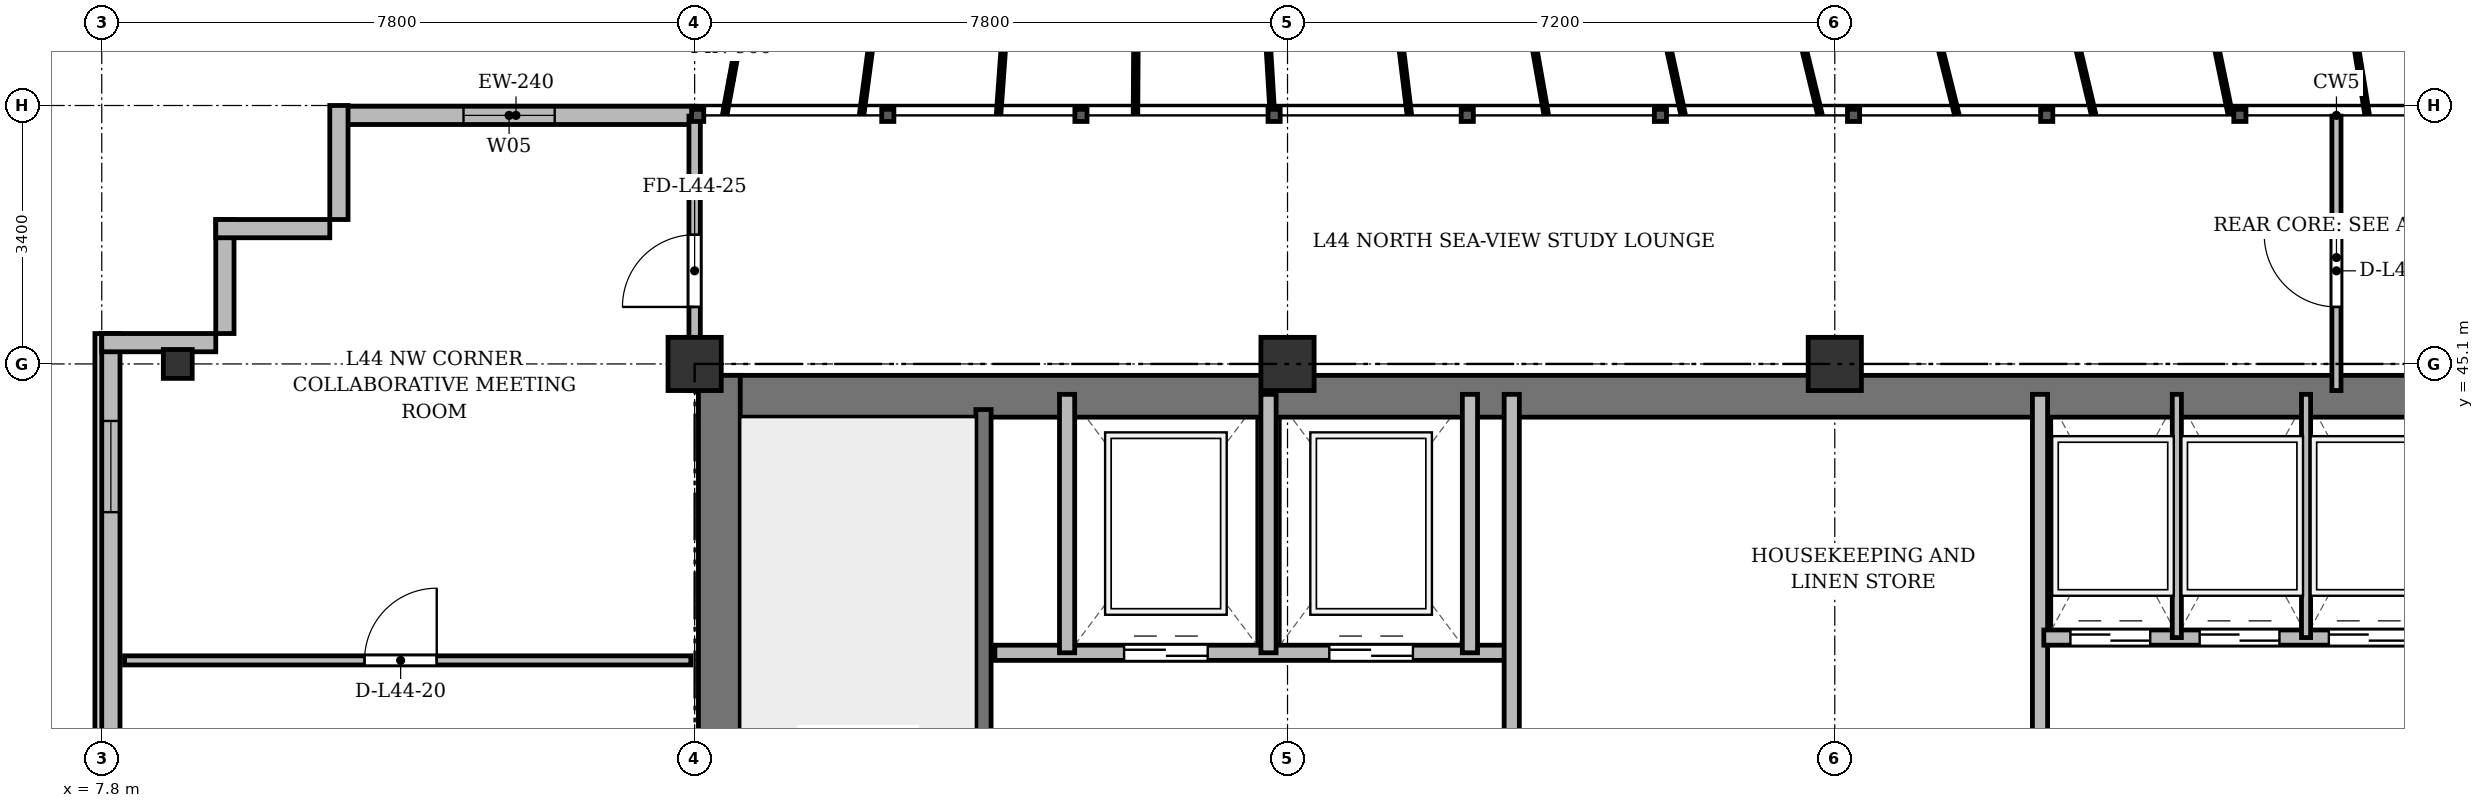
"""IFC4 building model, lengths in metres.
Left out: names, types, materials, properties, quantities, classifications, styles, units other than length and angle.
Written with IfcOpenShell. Run it as: python <this file> out.ifc"""

import sys

from ifc_helpers import new_model, si_unit, direction, frame, frame_2d, origin, origin_2d, place, context, subcontext, project, spatial, rectangle, i_section, extrude, source, transform, mapped, element, fill, save


model = new_model("IFC4")
c1 = context("Model", 3, precision=1e-05, world=origin(), true_north=direction((0.0, 1.0)))
c2 = subcontext(c1, "Body", "Model", "MODEL_VIEW")
j1 = project(units=[si_unit("LENGTHUNIT", "METRE"), si_unit("PLANEANGLEUNIT", "RADIAN")], contexts=[c1])
p1 = place(None, origin())
s1 = spatial("IfcSite", under=j1, at=p1, CompositionType="ELEMENT")
p2 = place(p1, origin())
s2 = spatial("IfcBuilding", under=s1, at=p2, CompositionType="ELEMENT")
p3 = place(p2, frame((0.0, 0.0, 168.1)))
s3 = spatial("IfcBuildingStorey", under=s2, at=p3, CompositionType="ELEMENT", Elevation=168.1)
m1 = source(origin(), c2, "Body", "SweptSolid", [
    extrude(i_section(OverallWidth=0.38, OverallDepth=0.38, WebThickness=0.02, FlangeThickness=0.03, at=origin_2d()), origin(), (0.0, 0.0, 1.0), 3.6),
])
p4 = place(p3, frame((8.8, 45.1, 0.0), z_axis=(0.0, 0.0, 1.0), x_axis=(1.0, 0.0, 0.0)))
e1 = element("IfcColumn", 1, at=p4, inside=s3, PredefinedType="COLUMN", context=c2, shape_type="MappedRepresentation", body=[
    mapped(m1, transform((0.0, 0.0, 0.0), x_axis=(1.0, 0.0, 0.0), y_axis=(0.0, 1.0, 0.0), z_axis=(0.0, 0.0, 1.0), scale=1.0)),
])
m2 = source(origin(), c2, "Body", "SweptSolid", [
    extrude(rectangle(XDim=0.7, YDim=0.7, at=origin_2d()), origin(), (0.0, 0.0, 1.0), 3.6),
])
for number, where, z_axis, x_axis in (
    (2, (15.6, 45.1, 0.0), (0.0, 0.0, 1.0), (1.0, 0.0, 0.0)),
    (3, (23.4, 45.1, 0.0), (0.0, 0.0, 1.0), (1.0, 0.0, 0.0)),
    (4, (30.6, 45.1, 0.0), (0.0, 0.0, 1.0), (1.0, 0.0, 0.0)),
):
    element("IfcColumn", number, at=place(p3, frame(where, z_axis=z_axis, x_axis=x_axis)), inside=s3, PredefinedType="COLUMN", context=c2, shape_type="MappedRepresentation", body=[
        mapped(m2, transform((0.0, 0.0, 0.0), x_axis=(1.0, 0.0, 0.0), y_axis=(0.0, 1.0, 0.0), z_axis=(0.0, 0.0, 1.0), scale=1.0)),
    ])
p5 = place(p3, frame((10.9, 48.37, 0.0), z_axis=(0.0, 0.0, 1.0), x_axis=(1.0, 0.0, 0.0)))
e5 = element("IfcWall", 5, at=p5, inside=s3, PredefinedType="SOLIDWALL", context=c2, shape_type="SweptSolid", body=[
    extrude(rectangle(XDim=4.7, YDim=0.24, at=frame_2d((2.35, 0.0))), origin(), (0.0, 0.0, 1.0), 3.35),
])
p6 = place(p5, frame((1.659, 0.0, 0.9)))
e6 = element("IfcOpeningElement", 6, at=p6, cuts=e5, PredefinedType="OPENING", context=c2, shape_type="SweptSolid", body=[
    extrude(rectangle(XDim=1.2, YDim=1.65, at=frame_2d((0.6, 0.825))), frame((0.0, 0.13, 0.0), z_axis=(0.0, -1.0, 0.0), x_axis=(1.0, 0.0, 0.0)), (0.0, 0.0, 1.0), 0.26),
])
p7 = place(p3, frame((7.92, 6.3, 0.0), z_axis=(0.0, 0.0, 1.0), x_axis=(0.0, 1.0, 0.0)))
e7 = element("IfcWall", 7, at=p7, inside=s3, PredefinedType="SOLIDWALL", context=c2, shape_type="SweptSolid", body=[
    extrude(rectangle(XDim=39.2, YDim=0.24, at=frame_2d((19.6, 0.0))), origin(), (0.0, 0.0, 1.0), 3.35),
])
p8 = place(p7, frame((1.45, 0.0, 0.92)))
e8 = element("IfcOpeningElement", 8, at=p8, cuts=e7, PredefinedType="OPENING", context=c2, shape_type="SweptSolid", body=[
    extrude(rectangle(XDim=1.2, YDim=1.65, at=frame_2d((0.6, 0.825))), frame((0.0, 0.13, 0.0), z_axis=(0.0, -1.0, 0.0), x_axis=(1.0, 0.0, 0.0)), (0.0, 0.0, 1.0), 0.26),
])
p9 = place(p7, frame((3.8, 0.0, 0.92)))
e9 = element("IfcOpeningElement", 9, at=p9, cuts=e7, PredefinedType="OPENING", context=c2, shape_type="SweptSolid", body=[
    extrude(rectangle(XDim=2.6, YDim=1.9, at=frame_2d((1.3, 0.95))), frame((0.0, 0.13, 0.0), z_axis=(0.0, -1.0, 0.0), x_axis=(1.0, 0.0, 0.0)), (0.0, 0.0, 1.0), 0.26),
])
p10 = place(p7, frame((8.0, 0.0, 0.92)))
e10 = element("IfcOpeningElement", 10, at=p10, cuts=e7, PredefinedType="OPENING", context=c2, shape_type="SweptSolid", body=[
    extrude(rectangle(XDim=2.6, YDim=1.9, at=frame_2d((1.3, 0.95))), frame((0.0, 0.13, 0.0), z_axis=(0.0, -1.0, 0.0), x_axis=(1.0, 0.0, 0.0)), (0.0, 0.0, 1.0), 0.26),
])
p11 = place(p7, frame((15.2, 0.0, 0.92)))
e11 = element("IfcOpeningElement", 11, at=p11, cuts=e7, PredefinedType="OPENING", context=c2, shape_type="SweptSolid", body=[
    extrude(rectangle(XDim=2.6, YDim=1.9, at=frame_2d((1.3, 0.95))), frame((0.0, 0.13, 0.0), z_axis=(0.0, -1.0, 0.0), x_axis=(1.0, 0.0, 0.0)), (0.0, 0.0, 1.0), 0.26),
])
p12 = place(p7, frame((29.2, 0.0, 0.92)))
e12 = element("IfcOpeningElement", 12, at=p12, cuts=e7, PredefinedType="OPENING", context=c2, shape_type="SweptSolid", body=[
    extrude(rectangle(XDim=2.6, YDim=1.9, at=frame_2d((1.3, 0.95))), frame((0.0, 0.13, 0.0), z_axis=(0.0, -1.0, 0.0), x_axis=(1.0, 0.0, 0.0)), (0.0, 0.0, 1.0), 0.26),
])
p13 = place(p7, frame((36.85, 0.0, 0.92)))
e13 = element("IfcOpeningElement", 13, at=p13, cuts=e7, PredefinedType="OPENING", context=c2, shape_type="SweptSolid", body=[
    extrude(rectangle(XDim=1.2, YDim=1.65, at=frame_2d((0.6, 0.825))), frame((0.0, 0.13, 0.0), z_axis=(0.0, -1.0, 0.0), x_axis=(1.0, 0.0, 0.0)), (0.0, 0.0, 1.0), 0.26),
])
for number, where, z_axis, x_axis in (
    (14, (7.8, 45.38, 0.0), (0.0, 0.0, 1.0), (1.0, 0.0, 0.0)),
    (15, (9.42, 45.5, 0.0), (0.0, 0.0, 1.0), (0.0, 1.0, 0.0)),
    (16, (9.3, 46.88, 0.0), (0.0, 0.0, 1.0), (1.0, 0.0, 0.0)),
    (17, (10.92, 47.0, 0.0), (0.0, 0.0, 1.0), (0.0, 1.0, 0.0)),
):
    element("IfcWall", number, at=place(p3, frame(where, z_axis=z_axis, x_axis=x_axis)), inside=s3, PredefinedType="SOLIDWALL", context=c2, shape_type="SweptSolid", body=[
        extrude(rectangle(XDim=1.5, YDim=0.24, at=frame_2d((0.75, 0.0))), origin(), (0.0, 0.0, 1.0), 3.35),
    ])
p14 = place(p3, frame((15.65, 44.675, 0.0), z_axis=(0.0, 0.0, 1.0), x_axis=(1.0, 0.0, 0.0)))
e18 = element("IfcWall", 18, at=p14, inside=s3, PredefinedType="SHEAR", context=c2, shape_type="SweptSolid", body=[
    extrude(rectangle(XDim=43.1, YDim=0.55, at=frame_2d((21.55, 0.0))), origin(), (0.0, 0.0, 1.0), 3.35),
])
p15 = place(p3, frame((15.925, 33.4, 0.0), z_axis=(0.0, 0.0, 1.0), x_axis=(0.0, 1.0, 0.0)))
e19 = element("IfcWall", 19, at=p15, inside=s3, PredefinedType="SHEAR", context=c2, shape_type="SweptSolid", body=[
    extrude(rectangle(XDim=11.55, YDim=0.55, at=frame_2d((5.775, 0.0))), origin(), (0.0, 0.0, 1.0), 3.35),
])
p16 = place(p3, frame((19.4, 33.4, 0.0), z_axis=(0.0, 0.0, 1.0), x_axis=(0.0, 1.0, 0.0)))
e20 = element("IfcWall", 20, at=p16, inside=s3, PredefinedType="SHEAR", context=c2, shape_type="SweptSolid", body=[
    extrude(rectangle(XDim=11.1, YDim=0.2, at=frame_2d((5.55, 0.0))), origin(), (0.0, 0.0, 1.0), 3.35),
])
p17 = place(p16, frame((0.85, 0.0, 0.0)))
e21 = element("IfcOpeningElement", 21, at=p17, cuts=e20, PredefinedType="OPENING", context=c2, shape_type="SweptSolid", body=[
    extrude(rectangle(XDim=1.1, YDim=2.15, at=frame_2d((0.55, 1.075))), frame((0.0, 0.11, 0.0), z_axis=(0.0, -1.0, 0.0), x_axis=(1.0, 0.0, 0.0)), (0.0, 0.0, 1.0), 0.22),
])
p18 = place(p3, frame((19.55, 41.3, 0.0), z_axis=(0.0, 0.0, 1.0), x_axis=(1.0, 0.0, 0.0)))
e22 = element("IfcWall", 22, at=p18, inside=s3, PredefinedType="SOLIDWALL", context=c2, shape_type="SweptSolid", body=[
    extrude(rectangle(XDim=6.75, YDim=0.2, at=frame_2d((3.375, 0.0))), origin(), (0.0, 0.0, 1.0), 3.35),
])
p19 = place(p18, frame((1.7, 0.0, 0.0)))
e23 = element("IfcOpeningElement", 23, at=p19, cuts=e22, PredefinedType="OPENING", context=c2, shape_type="SweptSolid", body=[
    extrude(rectangle(XDim=1.1, YDim=2.15, at=frame_2d((0.55, 1.075))), frame((0.0, 0.11, 0.0), z_axis=(0.0, -1.0, 0.0), x_axis=(1.0, 0.0, 0.0)), (0.0, 0.0, 1.0), 0.22),
])
p20 = place(p18, frame((4.4, 0.0, 0.0)))
e24 = element("IfcOpeningElement", 24, at=p20, cuts=e22, PredefinedType="OPENING", context=c2, shape_type="SweptSolid", body=[
    extrude(rectangle(XDim=1.1, YDim=2.15, at=frame_2d((0.55, 1.075))), frame((0.0, 0.11, 0.0), z_axis=(0.0, -1.0, 0.0), x_axis=(1.0, 0.0, 0.0)), (0.0, 0.0, 1.0), 0.22),
])
for number, where, z_axis, x_axis in (
    (25, (20.5, 41.3, 0.0), (0.0, 0.0, 1.0), (0.0, 1.0, 0.0)),
    (26, (23.15, 41.3, 0.0), (0.0, 0.0, 1.0), (0.0, 1.0, 0.0)),
    (27, (25.8, 41.3, 0.0), (0.0, 0.0, 1.0), (0.0, 1.0, 0.0)),
):
    element("IfcWall", number, at=place(p3, frame(where, z_axis=z_axis, x_axis=x_axis)), inside=s3, PredefinedType="SOLIDWALL", context=c2, shape_type="SweptSolid", body=[
        extrude(rectangle(XDim=3.4, YDim=0.2, at=frame_2d((1.7, 0.0))), origin(), (0.0, 0.0, 1.0), 3.35),
    ])
for number, where, z_axis, x_axis in (
    (28, (26.35, 33.4, 0.0), (0.0, 0.0, 1.0), (0.0, 1.0, 0.0)),
    (29, (33.3, 33.4, 0.0), (0.0, 0.0, 1.0), (0.0, 1.0, 0.0)),
):
    element("IfcWall", number, at=place(p3, frame(where, z_axis=z_axis, x_axis=x_axis)), inside=s3, PredefinedType="SOLIDWALL", context=c2, shape_type="SweptSolid", body=[
        extrude(rectangle(XDim=11.3, YDim=0.2, at=frame_2d((5.65, 0.0))), origin(), (0.0, 0.0, 1.0), 2.75),
    ])
p21 = place(p3, frame((33.35, 41.5, 0.0), z_axis=(0.0, 0.0, 1.0), x_axis=(1.0, 0.0, 0.0)))
e30 = element("IfcWall", 30, at=p21, inside=s3, PredefinedType="SOLIDWALL", context=c2, shape_type="SweptSolid", body=[
    extrude(rectangle(XDim=6.9, YDim=0.2, at=frame_2d((3.45, 0.0))), origin(), (0.0, 0.0, 1.0), 3.35),
])
p22 = place(p21, frame((0.35, 0.0, 0.0)))
e31 = element("IfcOpeningElement", 31, at=p22, cuts=e30, PredefinedType="OPENING", context=c2, shape_type="SweptSolid", body=[
    extrude(rectangle(XDim=1.05, YDim=2.15, at=frame_2d((0.525, 1.075))), frame((0.0, 0.11, 0.0), z_axis=(0.0, -1.0, 0.0), x_axis=(1.0, 0.0, 0.0)), (0.0, 0.0, 1.0), 0.22),
])
p23 = place(p21, frame((2.05, 0.0, 0.0)))
e32 = element("IfcOpeningElement", 32, at=p23, cuts=e30, PredefinedType="OPENING", context=c2, shape_type="SweptSolid", body=[
    extrude(rectangle(XDim=1.05, YDim=2.15, at=frame_2d((0.525, 1.075))), frame((0.0, 0.11, 0.0), z_axis=(0.0, -1.0, 0.0), x_axis=(1.0, 0.0, 0.0)), (0.0, 0.0, 1.0), 0.22),
])
p24 = place(p21, frame((3.75, 0.0, 0.0)))
e33 = element("IfcOpeningElement", 33, at=p24, cuts=e30, PredefinedType="OPENING", context=c2, shape_type="SweptSolid", body=[
    extrude(rectangle(XDim=1.05, YDim=2.15, at=frame_2d((0.525, 1.075))), frame((0.0, 0.11, 0.0), z_axis=(0.0, -1.0, 0.0), x_axis=(1.0, 0.0, 0.0)), (0.0, 0.0, 1.0), 0.22),
])
p25 = place(p21, frame((5.45, 0.0, 0.0)))
e34 = element("IfcOpeningElement", 34, at=p25, cuts=e30, PredefinedType="OPENING", context=c2, shape_type="SweptSolid", body=[
    extrude(rectangle(XDim=1.05, YDim=2.15, at=frame_2d((0.525, 1.075))), frame((0.0, 0.11, 0.0), z_axis=(0.0, -1.0, 0.0), x_axis=(1.0, 0.0, 0.0)), (0.0, 0.0, 1.0), 0.22),
])
for number, where, z_axis, x_axis in (
    (35, (35.1, 41.5, 0.0), (0.0, 0.0, 1.0), (0.0, 1.0, 0.0)),
    (36, (36.8, 41.5, 0.0), (0.0, 0.0, 1.0), (0.0, 1.0, 0.0)),
):
    element("IfcWall", number, at=place(p3, frame(where, z_axis=z_axis, x_axis=x_axis)), inside=s3, PredefinedType="PARTITIONING", context=c2, shape_type="SweptSolid", body=[
        extrude(rectangle(XDim=3.2, YDim=0.12, at=frame_2d((1.6, 0.0))), origin(), (0.0, 0.0, 1.0), 3.35),
    ])
p26 = place(p3, frame((8.1, 41.2, 0.0), z_axis=(0.0, 0.0, 1.0), x_axis=(1.0, 0.0, 0.0)))
e37 = element("IfcWall", 37, at=p26, inside=s3, PredefinedType="PARTITIONING", context=c2, shape_type="SweptSolid", body=[
    extrude(rectangle(XDim=7.45, YDim=0.12, at=frame_2d((3.725, 0.0))), origin(), (0.0, 0.0, 1.0), 2.85),
])
p27 = place(p26, frame((3.157, 0.0, 0.0)))
e38 = element("IfcOpeningElement", 38, at=p27, cuts=e37, PredefinedType="OPENING", context=c2, shape_type="SweptSolid", body=[
    extrude(rectangle(XDim=0.95, YDim=2.15, at=frame_2d((0.475, 1.075))), frame((0.0, 0.07, 0.0), z_axis=(0.0, -1.0, 0.0), x_axis=(1.0, 0.0, 0.0)), (0.0, 0.0, 1.0), 0.14),
])
p28 = place(p3, frame((37.2, 44.75, 0.0), z_axis=(0.0, 0.0, 1.0), x_axis=(0.0, 1.0, 0.0)))
e39 = element("IfcWall", 39, at=p28, inside=s3, PredefinedType="PARTITIONING", context=c2, shape_type="SweptSolid", body=[
    extrude(rectangle(XDim=3.61, YDim=0.12, at=frame_2d((1.805, 0.0))), origin(), (0.0, 0.0, 1.0), 2.75),
])
p29 = place(p28, frame((1.1, 0.0, 0.0)))
e40 = element("IfcOpeningElement", 40, at=p29, cuts=e39, PredefinedType="OPENING", context=c2, shape_type="SweptSolid", body=[
    extrude(rectangle(XDim=0.95, YDim=2.15, at=frame_2d((0.475, 1.075))), frame((0.0, 0.07, 0.0), z_axis=(0.0, -1.0, 0.0), x_axis=(1.0, 0.0, 0.0)), (0.0, 0.0, 1.0), 0.14),
])
p30 = place(p3, frame((15.6, 44.75, 0.0), z_axis=(0.0, 0.0, 1.0), x_axis=(0.0, 1.0, 0.0)))
e41 = element("IfcWall", 41, at=p30, inside=s3, PredefinedType="PARTITIONING", context=c2, shape_type="SweptSolid", body=[
    extrude(rectangle(XDim=3.61, YDim=0.15, at=frame_2d((1.805, 0.0))), origin(), (0.0, 0.0, 1.0), 2.85),
])
p31 = place(p30, frame((1.1, 0.0, 0.0)))
e42 = element("IfcOpeningElement", 42, at=p31, cuts=e41, PredefinedType="OPENING", context=c2, shape_type="SweptSolid", body=[
    extrude(rectangle(XDim=0.95, YDim=2.15, at=frame_2d((0.475, 1.075))), frame((0.0, 0.085, 0.0), z_axis=(0.0, -1.0, 0.0), x_axis=(1.0, 0.0, 0.0)), (0.0, 0.0, 1.0), 0.17),
])
m3 = source(origin(), c2, "Body", "SweptSolid", [
    extrude(rectangle(XDim=1.2, YDim=1.65, at=frame_2d((0.6, 0.825))), frame((0.0, 0.03, 0.0), z_axis=(0.0, -1.0, 0.0), x_axis=(1.0, 0.0, 0.0)), (0.0, 0.0, 1.0), 0.06),
])
p32 = place(p6, origin())
e43 = element("IfcWindow", 43, at=p32, inside=s3, PartitioningType="SINGLE_PANEL", PredefinedType="WINDOW", context=c2, shape_type="MappedRepresentation", body=[
    mapped(m3, transform((0.0, 0.0, 0.0), x_axis=(1.0, 0.0, 0.0), y_axis=(0.0, 1.0, 0.0), z_axis=(0.0, 0.0, 1.0), scale=1.0)),
])
fill(e6, e43)
p33 = place(p13, origin())
e44 = element("IfcWindow", 44, at=p33, inside=s3, PartitioningType="SINGLE_PANEL", PredefinedType="WINDOW", context=c2, shape_type="MappedRepresentation", body=[
    mapped(m3, transform((0.0, 0.0, 0.0), x_axis=(1.0, 0.0, 0.0), y_axis=(0.0, 1.0, 0.0), z_axis=(0.0, 0.0, 1.0), scale=1.0)),
])
fill(e13, e44)
m4 = source(origin(), c2, "Body", "SweptSolid", [
    extrude(rectangle(XDim=1.1, YDim=2.15, at=frame_2d((0.55, 1.075))), frame((0.0, 0.025, 0.0), z_axis=(0.0, -1.0, 0.0), x_axis=(1.0, 0.0, 0.0)), (0.0, 0.0, 1.0), 0.05),
])
p34 = place(p19, origin())
e45 = element("IfcDoor", 45, at=p34, inside=s3, OperationType="DOUBLE_DOOR_SLIDING", PredefinedType="DOOR", context=c2, shape_type="MappedRepresentation", body=[
    mapped(m4, transform((0.0, 0.0, 0.0), x_axis=(1.0, 0.0, 0.0), y_axis=(0.0, 1.0, 0.0), z_axis=(0.0, 0.0, 1.0), scale=1.0)),
])
fill(e23, e45)
p35 = place(p20, origin())
e46 = element("IfcDoor", 46, at=p35, inside=s3, OperationType="DOUBLE_DOOR_SLIDING", PredefinedType="DOOR", context=c2, shape_type="MappedRepresentation", body=[
    mapped(m4, transform((0.0, 0.0, 0.0), x_axis=(1.0, 0.0, 0.0), y_axis=(0.0, 1.0, 0.0), z_axis=(0.0, 0.0, 1.0), scale=1.0)),
])
fill(e24, e46)
m5 = source(origin(), c2, "Body", "SweptSolid", [
    extrude(rectangle(XDim=1.05, YDim=2.15, at=frame_2d((0.525, 1.075))), frame((0.0, 0.025, 0.0), z_axis=(0.0, -1.0, 0.0), x_axis=(1.0, 0.0, 0.0)), (0.0, 0.0, 1.0), 0.05),
])
p36 = place(p22, origin())
e47 = element("IfcDoor", 47, at=p36, inside=s3, OperationType="DOUBLE_DOOR_SLIDING", PredefinedType="DOOR", context=c2, shape_type="MappedRepresentation", body=[
    mapped(m5, transform((0.0, 0.0, 0.0), x_axis=(1.0, 0.0, 0.0), y_axis=(0.0, 1.0, 0.0), z_axis=(0.0, 0.0, 1.0), scale=1.0)),
])
fill(e31, e47)
p37 = place(p23, origin())
e48 = element("IfcDoor", 48, at=p37, inside=s3, OperationType="DOUBLE_DOOR_SLIDING", PredefinedType="DOOR", context=c2, shape_type="MappedRepresentation", body=[
    mapped(m5, transform((0.0, 0.0, 0.0), x_axis=(1.0, 0.0, 0.0), y_axis=(0.0, 1.0, 0.0), z_axis=(0.0, 0.0, 1.0), scale=1.0)),
])
fill(e32, e48)
p38 = place(p24, origin())
e49 = element("IfcDoor", 49, at=p38, inside=s3, OperationType="DOUBLE_DOOR_SLIDING", PredefinedType="DOOR", context=c2, shape_type="MappedRepresentation", body=[
    mapped(m5, transform((0.0, 0.0, 0.0), x_axis=(1.0, 0.0, 0.0), y_axis=(0.0, 1.0, 0.0), z_axis=(0.0, 0.0, 1.0), scale=1.0)),
])
fill(e33, e49)
m6 = source(origin(), c2, "Body", "SweptSolid", [
    extrude(rectangle(XDim=0.95, YDim=2.15, at=frame_2d((0.475, 1.075))), frame((0.0, 0.025, 0.0), z_axis=(0.0, -1.0, 0.0), x_axis=(1.0, 0.0, 0.0)), (0.0, 0.0, 1.0), 0.05),
])
p39 = place(p27, origin())
e50 = element("IfcDoor", 50, at=p39, inside=s3, OperationType="SINGLE_SWING_RIGHT", PredefinedType="DOOR", context=c2, shape_type="MappedRepresentation", body=[
    mapped(m6, transform((0.0, 0.0, 0.0), x_axis=(1.0, 0.0, 0.0), y_axis=(0.0, 1.0, 0.0), z_axis=(0.0, 0.0, 1.0), scale=1.0)),
])
fill(e38, e50)
p40 = place(p29, origin())
e51 = element("IfcDoor", 51, at=p40, inside=s3, OperationType="SINGLE_SWING_RIGHT", PredefinedType="DOOR", context=c2, shape_type="MappedRepresentation", body=[
    mapped(m6, transform((0.0, 0.0, 0.0), x_axis=(1.0, 0.0, 0.0), y_axis=(0.0, 1.0, 0.0), z_axis=(0.0, 0.0, 1.0), scale=1.0)),
])
fill(e40, e51)
p41 = place(p31, origin())
e52 = element("IfcDoor", 52, at=p41, inside=s3, OperationType="SINGLE_SWING_LEFT", PredefinedType="DOOR", context=c2, shape_type="MappedRepresentation", body=[
    mapped(m6, transform((0.0, 0.0, 0.0), x_axis=(1.0, 0.0, 0.0), y_axis=(0.0, 1.0, 0.0), z_axis=(0.0, 0.0, 1.0), scale=1.0)),
])
fill(e42, e52)
save(model, sys.argv[1])
